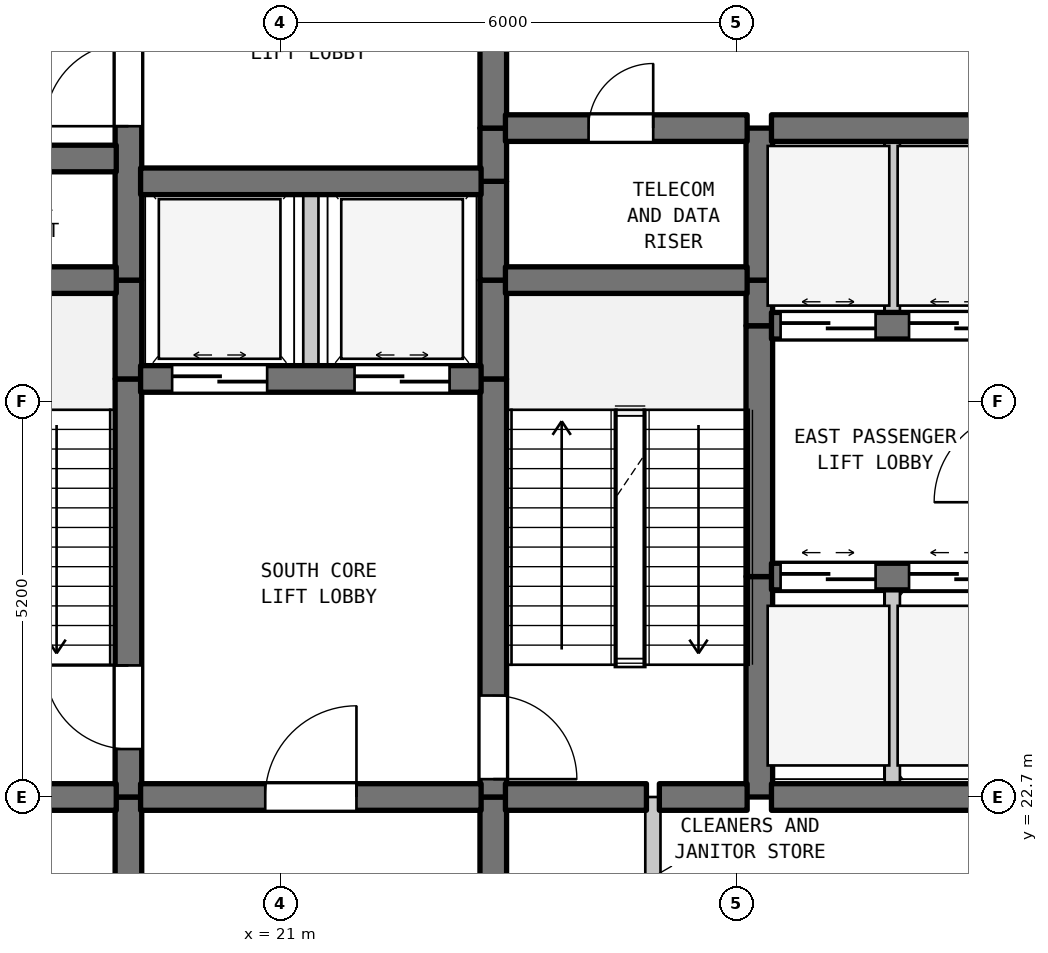
"""IFC4 building model, lengths in metres.
Left out: names, types, materials, properties, quantities, classifications, styles, units other than length and angle.
Written with IfcOpenShell. Run it as: python <this file> out.ifc"""

import sys

from ifc_helpers import new_model, si_unit, direction, frame, frame_2d, origin, place, context, subcontext, project, spatial, rectangle, extrude, element, fill, save


model = new_model("IFC4")
c1 = context("Model", 3, precision=1e-05, world=origin(), true_north=direction((0.0, 1.0)))
c2 = subcontext(c1, "Body", "Model", "MODEL_VIEW")
j1 = project(units=[si_unit("LENGTHUNIT", "METRE"), si_unit("PLANEANGLEUNIT", "RADIAN")], contexts=[c1])
p1 = place(None, origin())
s1 = spatial("IfcSite", under=j1, at=p1, CompositionType="ELEMENT")
p2 = place(p1, origin())
s2 = spatial("IfcBuilding", under=s1, at=p2, CompositionType="ELEMENT")
p3 = place(p2, frame((0.0, 0.0, 81.2)))
s3 = spatial("IfcBuildingStorey", under=s2, at=p3, CompositionType="ELEMENT", Elevation=81.2)
p4 = place(p3, frame((19.0, 19.5, 0.0), z_axis=(0.0, 0.0, 1.0), x_axis=(0.0, 1.0, 0.0)))
e1 = element("IfcWall", 1, at=p4, inside=s3, PredefinedType="SHEAR", context=c2, shape_type="SweptSolid", body=[
    extrude(rectangle(XDim=3.2, YDim=0.35, at=frame_2d((1.6, 0.0))), origin(), (0.0, 0.0, 1.0), 4.885),
])
p5 = place(p3, frame((19.0, 22.7, 0.0), z_axis=(0.0, 0.0, 1.0), x_axis=(0.0, 1.0, 0.0)))
e2 = element("IfcWall", 2, at=p5, inside=s3, PredefinedType="SHEAR", context=c2, shape_type="SweptSolid", body=[
    extrude(rectangle(XDim=5.5, YDim=0.35, at=frame_2d((2.75, 0.0))), origin(), (0.0, 0.0, 1.0), 4.885),
])
p6 = place(p5, frame((0.631, 0.0, 0.0)))
e3 = element("IfcOpeningElement", 3, at=p6, cuts=e2, PredefinedType="OPENING", context=c2, shape_type="SweptSolid", body=[
    extrude(rectangle(XDim=1.1, YDim=2.15, at=frame_2d((0.55, 1.075))), frame((0.0, 0.185, 0.0), z_axis=(0.0, -1.0, 0.0), x_axis=(1.0, 0.0, 0.0)), (0.0, 0.0, 1.0), 0.37),
])
p7 = place(p3, frame((19.0, 28.2, 0.0), z_axis=(0.0, 0.0, 1.0), x_axis=(0.0, 1.0, 0.0)))
e4 = element("IfcWall", 4, at=p7, inside=s3, PredefinedType="SHEAR", context=c2, shape_type="SweptSolid", body=[
    extrude(rectangle(XDim=1.3, YDim=0.35, at=frame_2d((0.65, 0.0))), origin(), (0.0, 0.0, 1.0), 4.885),
])
p8 = place(p3, frame((19.0, 29.5, 0.0), z_axis=(0.0, 0.0, 1.0), x_axis=(0.0, 1.0, 0.0)))
e5 = element("IfcWall", 5, at=p8, inside=s3, PredefinedType="SHEAR", context=c2, shape_type="SweptSolid", body=[
    extrude(rectangle(XDim=5.5, YDim=0.35, at=frame_2d((2.75, 0.0))), origin(), (0.0, 0.0, 1.0), 4.885),
])
p9 = place(p8, frame((2.025, 0.0, 0.0)))
e6 = element("IfcOpeningElement", 6, at=p9, cuts=e5, PredefinedType="OPENING", context=c2, shape_type="SweptSolid", body=[
    extrude(rectangle(XDim=1.1, YDim=2.15, at=frame_2d((0.55, 1.075))), frame((0.0, 0.185, 0.0), z_axis=(0.0, -1.0, 0.0), x_axis=(1.0, 0.0, 0.0)), (0.0, 0.0, 1.0), 0.37),
])
p10 = place(p3, frame((21.4, 28.2, 0.0), z_axis=(0.0, 0.0, 1.0), x_axis=(0.0, 1.0, 0.0)))
e7 = element("IfcWall", 7, at=p10, inside=s3, PredefinedType="STANDARD", context=c2, shape_type="SweptSolid", body=[
    extrude(rectangle(XDim=2.6, YDim=0.2, at=frame_2d((1.3, 0.0))), origin(), (0.0, 0.0, 1.0), 4.885),
])
p11 = place(p3, frame((23.8, 19.5, 0.0), z_axis=(0.0, 0.0, 1.0), x_axis=(0.0, 1.0, 0.0)))
e8 = element("IfcWall", 8, at=p11, inside=s3, PredefinedType="SHEAR", context=c2, shape_type="SweptSolid", body=[
    extrude(rectangle(XDim=3.2, YDim=0.35, at=frame_2d((1.6, 0.0))), origin(), (0.0, 0.0, 1.0), 4.885),
])
p12 = place(p3, frame((23.8, 22.7, 0.0), z_axis=(0.0, 0.0, 1.0), x_axis=(0.0, 1.0, 0.0)))
e9 = element("IfcWall", 9, at=p12, inside=s3, PredefinedType="SHEAR", context=c2, shape_type="SweptSolid", body=[
    extrude(rectangle(XDim=5.5, YDim=0.35, at=frame_2d((2.75, 0.0))), origin(), (0.0, 0.0, 1.0), 4.885),
])
p13 = place(p12, frame((0.235, 0.0, 0.0)))
e10 = element("IfcOpeningElement", 10, at=p13, cuts=e9, PredefinedType="OPENING", context=c2, shape_type="SweptSolid", body=[
    extrude(rectangle(XDim=1.1, YDim=2.15, at=frame_2d((0.55, 1.075))), frame((0.0, 0.185, 0.0), z_axis=(0.0, -1.0, 0.0), x_axis=(1.0, 0.0, 0.0)), (0.0, 0.0, 1.0), 0.37),
])
for number, where, z_axis, x_axis in (
    (11, (23.8, 28.2, 0.0), (0.0, 0.0, 1.0), (0.0, 1.0, 0.0)),
    (12, (23.8, 29.5, 0.0), (0.0, 0.0, 1.0), (0.0, 1.0, 0.0)),
):
    element("IfcWall", number, at=place(p3, frame(where, z_axis=z_axis, x_axis=x_axis)), inside=s3, PredefinedType="SHEAR", context=c2, shape_type="SweptSolid", body=[
        extrude(rectangle(XDim=1.3, YDim=0.35, at=frame_2d((0.65, 0.0))), origin(), (0.0, 0.0, 1.0), 4.885),
    ])
p14 = place(p3, frame((23.8, 30.8, 0.0), z_axis=(0.0, 0.0, 1.0), x_axis=(0.0, 1.0, 0.0)))
e13 = element("IfcWall", 13, at=p14, inside=s3, PredefinedType="SHEAR", context=c2, shape_type="SweptSolid", body=[
    extrude(rectangle(XDim=0.7, YDim=0.35, at=frame_2d((0.35, 0.0))), origin(), (0.0, 0.0, 1.0), 4.885),
])
p15 = place(p3, frame((23.8, 31.5, 0.0), z_axis=(0.0, 0.0, 1.0), x_axis=(0.0, 1.0, 0.0)))
e14 = element("IfcWall", 14, at=p15, inside=s3, PredefinedType="SHEAR", context=c2, shape_type="SweptSolid", body=[
    extrude(rectangle(XDim=3.5, YDim=0.35, at=frame_2d((1.75, 0.0))), origin(), (0.0, 0.0, 1.0), 4.885),
])
p16 = place(p15, frame((1.127, 0.0, 0.0)))
e15 = element("IfcOpeningElement", 15, at=p16, cuts=e14, PredefinedType="OPENING", context=c2, shape_type="SweptSolid", body=[
    extrude(rectangle(XDim=1.1, YDim=2.15, at=frame_2d((0.55, 1.075))), frame((0.0, 0.185, 0.0), z_axis=(0.0, -1.0, 0.0), x_axis=(1.0, 0.0, 0.0)), (0.0, 0.0, 1.0), 0.37),
])
p17 = place(p3, frame((25.9, 19.5, 0.0), z_axis=(0.0, 0.0, 1.0), x_axis=(0.0, 1.0, 0.0)))
e16 = element("IfcWall", 16, at=p17, inside=s3, PredefinedType="STANDARD", context=c2, shape_type="SweptSolid", body=[
    extrude(rectangle(XDim=3.2, YDim=0.2, at=frame_2d((1.6, 0.0))), origin(), (0.0, 0.0, 1.0), 4.885),
])
p18 = place(p3, frame((27.3, 22.7, 0.0), z_axis=(0.0, 0.0, 1.0), x_axis=(0.0, 1.0, 0.0)))
e17 = element("IfcWall", 17, at=p18, inside=s3, PredefinedType="SHEAR", context=c2, shape_type="SweptSolid", body=[
    extrude(rectangle(XDim=2.9, YDim=0.35, at=frame_2d((1.45, 0.0))), origin(), (0.0, 0.0, 1.0), 4.885),
])
p19 = place(p3, frame((27.3, 25.6, 0.0), z_axis=(0.0, 0.0, 1.0), x_axis=(0.0, 1.0, 0.0)))
e18 = element("IfcWall", 18, at=p19, inside=s3, PredefinedType="SHEAR", context=c2, shape_type="SweptSolid", body=[
    extrude(rectangle(XDim=3.3, YDim=0.35, at=frame_2d((1.65, 0.0))), origin(), (0.0, 0.0, 1.0), 4.885),
])
p20 = place(p3, frame((27.3, 28.9, 0.0), z_axis=(0.0, 0.0, 1.0), x_axis=(0.0, 1.0, 0.0)))
e19 = element("IfcWall", 19, at=p20, inside=s3, PredefinedType="SHEAR", context=c2, shape_type="SweptSolid", body=[
    extrude(rectangle(XDim=0.6, YDim=0.35, at=frame_2d((0.3, 0.0))), origin(), (0.0, 0.0, 1.0), 4.885),
])
p21 = place(p3, frame((27.3, 29.5, 0.0), z_axis=(0.0, 0.0, 1.0), x_axis=(0.0, 1.0, 0.0)))
e20 = element("IfcWall", 20, at=p21, inside=s3, PredefinedType="SHEAR", context=c2, shape_type="SweptSolid", body=[
    extrude(rectangle(XDim=2.0, YDim=0.35, at=frame_2d((1.0, 0.0))), origin(), (0.0, 0.0, 1.0), 4.885),
])
p22 = place(p3, frame((29.05, 22.7, 0.0), z_axis=(0.0, 0.0, 1.0), x_axis=(0.0, 1.0, 0.0)))
e21 = element("IfcWall", 21, at=p22, inside=s3, PredefinedType="STANDARD", context=c2, shape_type="SweptSolid", body=[
    extrude(rectangle(XDim=2.9, YDim=0.2, at=frame_2d((1.45, 0.0))), origin(), (0.0, 0.0, 1.0), 4.885),
])
p23 = place(p3, frame((29.05, 28.9, 0.0), z_axis=(0.0, 0.0, 1.0), x_axis=(0.0, 1.0, 0.0)))
e22 = element("IfcWall", 22, at=p23, inside=s3, PredefinedType="STANDARD", context=c2, shape_type="SweptSolid", body=[
    extrude(rectangle(XDim=2.6, YDim=0.2, at=frame_2d((1.3, 0.0))), origin(), (0.0, 0.0, 1.0), 4.885),
])
p24 = place(p3, frame((15.16, 22.7, 0.0), z_axis=(0.0, 0.0, 1.0), x_axis=(1.0, 0.0, 0.0)))
e23 = element("IfcWall", 23, at=p24, inside=s3, PredefinedType="SHEAR", context=c2, shape_type="SweptSolid", body=[
    extrude(rectangle(XDim=3.68, YDim=0.35, at=frame_2d((1.84, 0.0))), origin(), (0.0, 0.0, 1.0), 4.885),
])
p25 = place(p3, frame((19.16, 22.7, 0.0), z_axis=(0.0, 0.0, 1.0), x_axis=(1.0, 0.0, 0.0)))
e24 = element("IfcWall", 24, at=p25, inside=s3, PredefinedType="SHEAR", context=c2, shape_type="SweptSolid", body=[
    extrude(rectangle(XDim=4.48, YDim=0.35, at=frame_2d((2.24, 0.0))), origin(), (0.0, 0.0, 1.0), 4.885),
])
p26 = place(p25, frame((1.64, 0.0, 0.0)))
e25 = element("IfcOpeningElement", 25, at=p26, cuts=e24, PredefinedType="OPENING", context=c2, shape_type="SweptSolid", body=[
    extrude(rectangle(XDim=1.2, YDim=2.2, at=frame_2d((0.6, 1.1))), frame((0.0, 0.185, 0.0), z_axis=(0.0, -1.0, 0.0), x_axis=(1.0, 0.0, 0.0)), (0.0, 0.0, 1.0), 0.37),
])
p27 = place(p3, frame((23.96, 22.7, 0.0), z_axis=(0.0, 0.0, 1.0), x_axis=(1.0, 0.0, 0.0)))
e26 = element("IfcWall", 26, at=p27, inside=s3, PredefinedType="SHEAR", context=c2, shape_type="SweptSolid", body=[
    extrude(rectangle(XDim=1.855, YDim=0.35, at=frame_2d((0.927, 0.0))), origin(), (0.0, 0.0, 1.0), 4.885),
])
p28 = place(p3, frame((25.985, 22.7, 0.0), z_axis=(0.0, 0.0, 1.0), x_axis=(1.0, 0.0, 0.0)))
e27 = element("IfcWall", 27, at=p28, inside=s3, PredefinedType="SHEAR", context=c2, shape_type="SweptSolid", body=[
    extrude(rectangle(XDim=1.155, YDim=0.35, at=frame_2d((0.577, 0.0))), origin(), (0.0, 0.0, 1.0), 4.885),
])
p29 = place(p3, frame((27.46, 22.7, 0.0), z_axis=(0.0, 0.0, 1.0), x_axis=(1.0, 0.0, 0.0)))
e28 = element("IfcWall", 28, at=p29, inside=s3, PredefinedType="SHEAR", context=c2, shape_type="SweptSolid", body=[
    extrude(rectangle(XDim=3.18, YDim=0.35, at=frame_2d((1.59, 0.0))), origin(), (0.0, 0.0, 1.0), 4.885),
])
p30 = place(p3, frame((27.46, 25.6, 0.0), z_axis=(0.0, 0.0, 1.0), x_axis=(1.0, 0.0, 0.0)))
e29 = element("IfcWall", 29, at=p30, inside=s3, PredefinedType="SHEAR", context=c2, shape_type="SweptSolid", body=[
    extrude(rectangle(XDim=3.18, YDim=0.35, at=frame_2d((1.59, 0.0))), origin(), (0.0, 0.0, 1.0), 4.885),
])
p31 = place(p30, frame((0.12, 0.0, 0.0)))
e30 = element("IfcOpeningElement", 30, at=p31, cuts=e29, PredefinedType="OPENING", context=c2, shape_type="SweptSolid", body=[
    extrude(rectangle(XDim=1.25, YDim=2.2, at=frame_2d((0.625, 1.1))), frame((0.0, 0.185, 0.0), z_axis=(0.0, -1.0, 0.0), x_axis=(1.0, 0.0, 0.0)), (0.0, 0.0, 1.0), 0.37),
])
p32 = place(p30, frame((1.81, 0.0, 0.0)))
e31 = element("IfcOpeningElement", 31, at=p32, cuts=e29, PredefinedType="OPENING", context=c2, shape_type="SweptSolid", body=[
    extrude(rectangle(XDim=1.25, YDim=2.2, at=frame_2d((0.625, 1.1))), frame((0.0, 0.185, 0.0), z_axis=(0.0, -1.0, 0.0), x_axis=(1.0, 0.0, 0.0)), (0.0, 0.0, 1.0), 0.37),
])
p33 = place(p3, frame((19.16, 28.2, 0.0), z_axis=(0.0, 0.0, 1.0), x_axis=(1.0, 0.0, 0.0)))
e32 = element("IfcWall", 32, at=p33, inside=s3, PredefinedType="SHEAR", context=c2, shape_type="SweptSolid", body=[
    extrude(rectangle(XDim=4.48, YDim=0.35, at=frame_2d((2.24, 0.0))), origin(), (0.0, 0.0, 1.0), 4.885),
])
p34 = place(p33, frame((0.415, 0.0, 0.0)))
e33 = element("IfcOpeningElement", 33, at=p34, cuts=e32, PredefinedType="OPENING", context=c2, shape_type="SweptSolid", body=[
    extrude(rectangle(XDim=1.25, YDim=2.2, at=frame_2d((0.625, 1.1))), frame((0.0, 0.185, 0.0), z_axis=(0.0, -1.0, 0.0), x_axis=(1.0, 0.0, 0.0)), (0.0, 0.0, 1.0), 0.37),
])
p35 = place(p33, frame((2.815, 0.0, 0.0)))
e34 = element("IfcOpeningElement", 34, at=p35, cuts=e32, PredefinedType="OPENING", context=c2, shape_type="SweptSolid", body=[
    extrude(rectangle(XDim=1.25, YDim=2.2, at=frame_2d((0.625, 1.1))), frame((0.0, 0.185, 0.0), z_axis=(0.0, -1.0, 0.0), x_axis=(1.0, 0.0, 0.0)), (0.0, 0.0, 1.0), 0.37),
])
p36 = place(p3, frame((27.46, 28.9, 0.0), z_axis=(0.0, 0.0, 1.0), x_axis=(1.0, 0.0, 0.0)))
e35 = element("IfcWall", 35, at=p36, inside=s3, PredefinedType="SHEAR", context=c2, shape_type="SweptSolid", body=[
    extrude(rectangle(XDim=3.18, YDim=0.35, at=frame_2d((1.59, 0.0))), origin(), (0.0, 0.0, 1.0), 4.885),
])
p37 = place(p36, frame((0.12, 0.0, 0.0)))
e36 = element("IfcOpeningElement", 36, at=p37, cuts=e35, PredefinedType="OPENING", context=c2, shape_type="SweptSolid", body=[
    extrude(rectangle(XDim=1.25, YDim=2.2, at=frame_2d((0.625, 1.1))), frame((0.0, 0.185, 0.0), z_axis=(0.0, -1.0, 0.0), x_axis=(1.0, 0.0, 0.0)), (0.0, 0.0, 1.0), 0.37),
])
p38 = place(p36, frame((1.81, 0.0, 0.0)))
e37 = element("IfcOpeningElement", 37, at=p38, cuts=e35, PredefinedType="OPENING", context=c2, shape_type="SweptSolid", body=[
    extrude(rectangle(XDim=1.25, YDim=2.2, at=frame_2d((0.625, 1.1))), frame((0.0, 0.185, 0.0), z_axis=(0.0, -1.0, 0.0), x_axis=(1.0, 0.0, 0.0)), (0.0, 0.0, 1.0), 0.37),
])
p39 = place(p3, frame((15.16, 29.5, 0.0), z_axis=(0.0, 0.0, 1.0), x_axis=(1.0, 0.0, 0.0)))
e38 = element("IfcWall", 38, at=p39, inside=s3, PredefinedType="SHEAR", context=c2, shape_type="SweptSolid", body=[
    extrude(rectangle(XDim=3.68, YDim=0.35, at=frame_2d((1.84, 0.0))), origin(), (0.0, 0.0, 1.0), 4.885),
])
p40 = place(p3, frame((23.96, 29.5, 0.0), z_axis=(0.0, 0.0, 1.0), x_axis=(1.0, 0.0, 0.0)))
e39 = element("IfcWall", 39, at=p40, inside=s3, PredefinedType="SHEAR", context=c2, shape_type="SweptSolid", body=[
    extrude(rectangle(XDim=3.18, YDim=0.35, at=frame_2d((1.59, 0.0))), origin(), (0.0, 0.0, 1.0), 4.885),
])
p41 = place(p3, frame((19.16, 30.8, 0.0), z_axis=(0.0, 0.0, 1.0), x_axis=(1.0, 0.0, 0.0)))
e40 = element("IfcWall", 40, at=p41, inside=s3, PredefinedType="SHEAR", context=c2, shape_type="SweptSolid", body=[
    extrude(rectangle(XDim=4.48, YDim=0.35, at=frame_2d((2.24, 0.0))), origin(), (0.0, 0.0, 1.0), 4.885),
])
p42 = place(p3, frame((15.16, 31.1, 0.0), z_axis=(0.0, 0.0, 1.0), x_axis=(1.0, 0.0, 0.0)))
e41 = element("IfcWall", 41, at=p42, inside=s3, PredefinedType="SHEAR", context=c2, shape_type="SweptSolid", body=[
    extrude(rectangle(XDim=3.68, YDim=0.35, at=frame_2d((1.84, 0.0))), origin(), (0.0, 0.0, 1.0), 4.885),
])
p43 = place(p3, frame((23.96, 31.5, 0.0), z_axis=(0.0, 0.0, 1.0), x_axis=(1.0, 0.0, 0.0)))
e42 = element("IfcWall", 42, at=p43, inside=s3, PredefinedType="SHEAR", context=c2, shape_type="SweptSolid", body=[
    extrude(rectangle(XDim=3.18, YDim=0.35, at=frame_2d((1.59, 0.0))), origin(), (0.0, 0.0, 1.0), 4.885),
])
p44 = place(p43, frame((1.094, 0.0, 0.0)))
e43 = element("IfcOpeningElement", 43, at=p44, cuts=e42, PredefinedType="OPENING", context=c2, shape_type="SweptSolid", body=[
    extrude(rectangle(XDim=0.85, YDim=2.1, at=frame_2d((0.425, 1.05))), frame((0.0, 0.185, 0.0), z_axis=(0.0, -1.0, 0.0), x_axis=(1.0, 0.0, 0.0)), (0.0, 0.0, 1.0), 0.37),
])
p45 = place(p3, frame((27.46, 31.5, 0.0), z_axis=(0.0, 0.0, 1.0), x_axis=(1.0, 0.0, 0.0)))
e44 = element("IfcWall", 44, at=p45, inside=s3, PredefinedType="SHEAR", context=c2, shape_type="SweptSolid", body=[
    extrude(rectangle(XDim=3.18, YDim=0.35, at=frame_2d((1.59, 0.0))), origin(), (0.0, 0.0, 1.0), 4.885),
])
p46 = place(p6, origin())
e45 = element("IfcDoor", 45, at=p46, inside=s3, OperationType="SINGLE_SWING_RIGHT", PredefinedType="DOOR", context=c2, shape_type="SweptSolid", body=[
    extrude(rectangle(XDim=1.1, YDim=2.15, at=frame_2d((0.55, 1.075))), frame((0.0, 0.025, 0.0), z_axis=(0.0, -1.0, 0.0), x_axis=(1.0, 0.0, 0.0)), (0.0, 0.0, 1.0), 0.05),
])
fill(e3, e45)
p47 = place(p9, origin())
e46 = element("IfcDoor", 46, at=p47, inside=s3, OperationType="SINGLE_SWING_LEFT", PredefinedType="DOOR", context=c2, shape_type="SweptSolid", body=[
    extrude(rectangle(XDim=1.1, YDim=2.15, at=frame_2d((0.55, 1.075))), frame((0.0, 0.025, 0.0), z_axis=(0.0, -1.0, 0.0), x_axis=(1.0, 0.0, 0.0)), (0.0, 0.0, 1.0), 0.05),
])
fill(e6, e46)
p48 = place(p13, frame((1.1, 0.0, 0.0), z_axis=(0.0, 0.0, 1.0), x_axis=(-1.0, 0.0, 0.0)))
e47 = element("IfcDoor", 47, at=p48, inside=s3, OperationType="SINGLE_SWING_LEFT", PredefinedType="DOOR", context=c2, shape_type="SweptSolid", body=[
    extrude(rectangle(XDim=1.1, YDim=2.15, at=frame_2d((0.55, 1.075))), frame((0.0, 0.025, 0.0), z_axis=(0.0, -1.0, 0.0), x_axis=(1.0, 0.0, 0.0)), (0.0, 0.0, 1.0), 0.05),
])
fill(e10, e47)
p49 = place(p26, origin())
e48 = element("IfcDoor", 48, at=p49, inside=s3, OperationType="SINGLE_SWING_RIGHT", PredefinedType="DOOR", context=c2, shape_type="SweptSolid", body=[
    extrude(rectangle(XDim=1.2, YDim=2.2, at=frame_2d((0.6, 1.1))), frame((0.0, 0.025, 0.0), z_axis=(0.0, -1.0, 0.0), x_axis=(1.0, 0.0, 0.0)), (0.0, 0.0, 1.0), 0.05),
])
fill(e25, e48)
p50 = place(p31, origin())
e49 = element("IfcDoor", 49, at=p50, inside=s3, OperationType="DOUBLE_DOOR_SLIDING", PredefinedType="DOOR", context=c2, shape_type="SweptSolid", body=[
    extrude(rectangle(XDim=1.25, YDim=2.2, at=frame_2d((0.625, 1.1))), frame((0.0, 0.025, 0.0), z_axis=(0.0, -1.0, 0.0), x_axis=(1.0, 0.0, 0.0)), (0.0, 0.0, 1.0), 0.05),
])
fill(e30, e49)
p51 = place(p32, origin())
e50 = element("IfcDoor", 50, at=p51, inside=s3, OperationType="DOUBLE_DOOR_SLIDING", PredefinedType="DOOR", context=c2, shape_type="SweptSolid", body=[
    extrude(rectangle(XDim=1.25, YDim=2.2, at=frame_2d((0.625, 1.1))), frame((0.0, 0.025, 0.0), z_axis=(0.0, -1.0, 0.0), x_axis=(1.0, 0.0, 0.0)), (0.0, 0.0, 1.0), 0.05),
])
fill(e31, e50)
p52 = place(p34, origin())
e51 = element("IfcDoor", 51, at=p52, inside=s3, OperationType="DOUBLE_DOOR_SLIDING", PredefinedType="DOOR", context=c2, shape_type="SweptSolid", body=[
    extrude(rectangle(XDim=1.25, YDim=2.2, at=frame_2d((0.625, 1.1))), frame((0.0, 0.025, 0.0), z_axis=(0.0, -1.0, 0.0), x_axis=(1.0, 0.0, 0.0)), (0.0, 0.0, 1.0), 0.05),
])
fill(e33, e51)
p53 = place(p35, origin())
e52 = element("IfcDoor", 52, at=p53, inside=s3, OperationType="DOUBLE_DOOR_SLIDING", PredefinedType="DOOR", context=c2, shape_type="SweptSolid", body=[
    extrude(rectangle(XDim=1.25, YDim=2.2, at=frame_2d((0.625, 1.1))), frame((0.0, 0.025, 0.0), z_axis=(0.0, -1.0, 0.0), x_axis=(1.0, 0.0, 0.0)), (0.0, 0.0, 1.0), 0.05),
])
fill(e34, e52)
p54 = place(p37, origin())
e53 = element("IfcDoor", 53, at=p54, inside=s3, OperationType="DOUBLE_DOOR_SLIDING", PredefinedType="DOOR", context=c2, shape_type="SweptSolid", body=[
    extrude(rectangle(XDim=1.25, YDim=2.2, at=frame_2d((0.625, 1.1))), frame((0.0, 0.025, 0.0), z_axis=(0.0, -1.0, 0.0), x_axis=(1.0, 0.0, 0.0)), (0.0, 0.0, 1.0), 0.05),
])
fill(e36, e53)
p55 = place(p38, origin())
e54 = element("IfcDoor", 54, at=p55, inside=s3, OperationType="DOUBLE_DOOR_SLIDING", PredefinedType="DOOR", context=c2, shape_type="SweptSolid", body=[
    extrude(rectangle(XDim=1.25, YDim=2.2, at=frame_2d((0.625, 1.1))), frame((0.0, 0.025, 0.0), z_axis=(0.0, -1.0, 0.0), x_axis=(1.0, 0.0, 0.0)), (0.0, 0.0, 1.0), 0.05),
])
fill(e37, e54)
p56 = place(p44, origin())
e55 = element("IfcDoor", 55, at=p56, inside=s3, OperationType="SINGLE_SWING_RIGHT", PredefinedType="DOOR", context=c2, shape_type="SweptSolid", body=[
    extrude(rectangle(XDim=0.85, YDim=2.1, at=frame_2d((0.425, 1.05))), frame((0.0, 0.025, 0.0), z_axis=(0.0, -1.0, 0.0), x_axis=(1.0, 0.0, 0.0)), (0.0, 0.0, 1.0), 0.05),
])
fill(e43, e55)
save(model, sys.argv[1])
